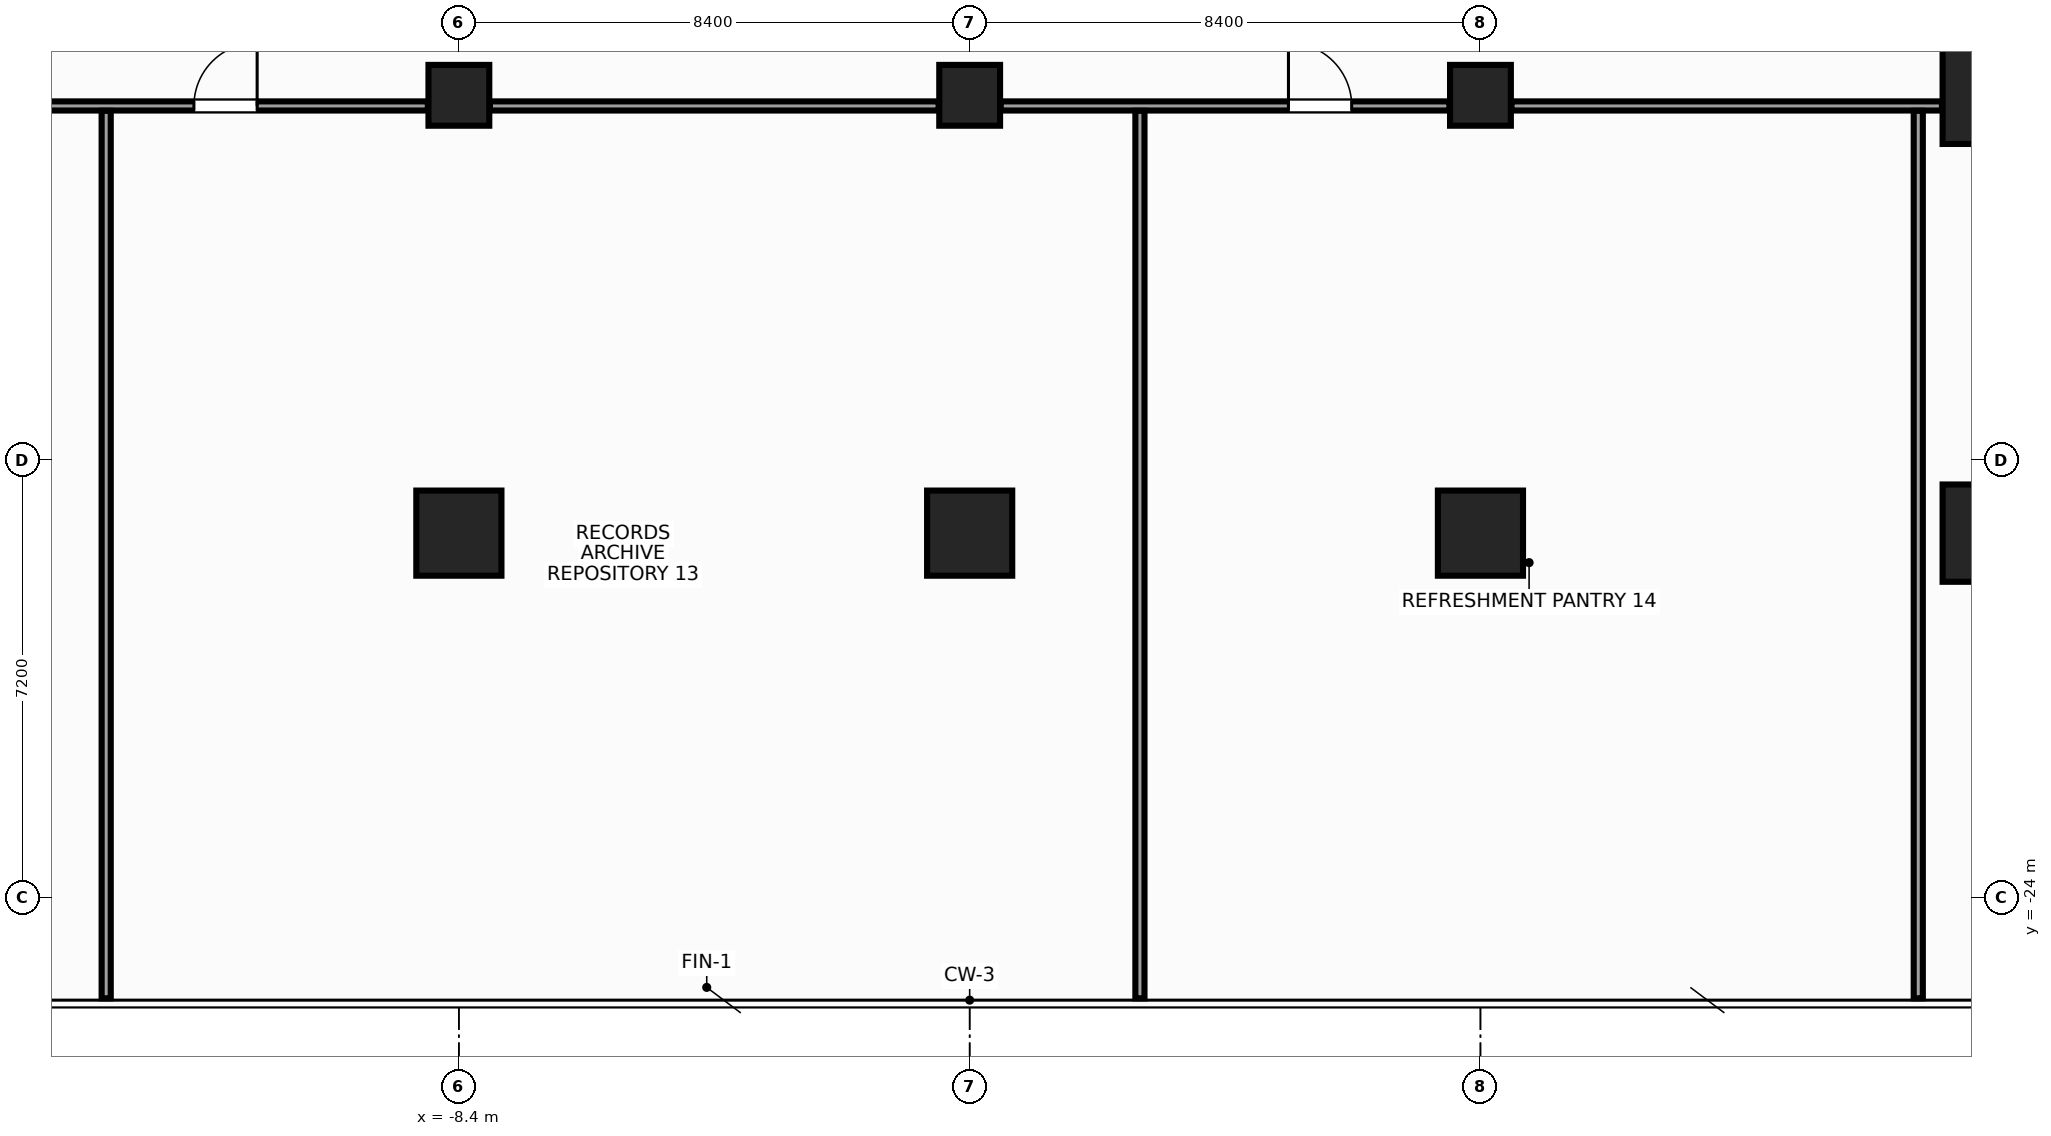
"""IFC4 building model, lengths in metres.
Left out: names, types, materials, properties, quantities, classifications, styles, units other than length and angle.
Written with IfcOpenShell. Run it as: python <this file> out.ifc"""

import sys

from ifc_helpers import new_model, si_unit, direction, frame, frame_2d, origin, origin_2d, place, context, subcontext, project, spatial, rectangle, hollow_rectangle, extrude, source, transform, mapped, element, fill, save


model = new_model("IFC4")
c1 = context("Model", 3, precision=1e-05, world=origin(), true_north=direction((0.0, 1.0)))
c2 = subcontext(c1, "Body", "Model", "MODEL_VIEW")
j1 = project(units=[si_unit("LENGTHUNIT", "METRE"), si_unit("PLANEANGLEUNIT", "RADIAN")], contexts=[c1])
p1 = place(None, origin())
s1 = spatial("IfcSite", under=j1, at=p1, CompositionType="ELEMENT")
p2 = place(p1, origin())
s2 = spatial("IfcBuilding", under=s1, at=p2, CompositionType="ELEMENT")
p3 = place(p2, frame((0.0, 0.0, 95.6)))
s3 = spatial("IfcBuildingStorey", under=s2, at=p3, CompositionType="ELEMENT", Elevation=95.6)
m1 = source(origin(), c2, "Body", "SweptSolid", [
    extrude(rectangle(XDim=1.6, YDim=1.6, at=origin_2d()), origin(), (0.0, 0.0, 1.0), 3.6),
])
for number, where, z_axis, x_axis in (
    (1, (16.8, -18.0, 0.0), (0.0, 0.0, 1.0), (1.0, 0.0, 0.0)),
    (2, (16.8, -10.8, 0.0), (0.0, 0.0, 1.0), (1.0, 0.0, 0.0)),
):
    element("IfcColumn", number, at=place(p3, frame(where, z_axis=z_axis, x_axis=x_axis)), inside=s3, PredefinedType="COLUMN", context=c2, shape_type="MappedRepresentation", body=[
        mapped(m1, transform((0.0, 0.0, 0.0), x_axis=(1.0, 0.0, 0.0), y_axis=(0.0, 1.0, 0.0), z_axis=(0.0, 0.0, 1.0), scale=1.0)),
    ])
m2 = source(origin(), c2, "Body", "SweptSolid", [
    extrude(rectangle(XDim=1.4, YDim=1.4, at=origin_2d()), origin(), (0.0, 0.0, 1.0), 3.6),
])
p4 = place(p3, frame((-8.4, -18.0, 0.0), z_axis=(0.0, 0.0, 1.0), x_axis=(1.0, 0.0, 0.0)))
e3 = element("IfcColumn", 3, at=p4, inside=s3, PredefinedType="COLUMN", context=c2, shape_type="MappedRepresentation", body=[
    mapped(m2, transform((0.0, 0.0, 0.0), x_axis=(1.0, 0.0, 0.0), y_axis=(0.0, 1.0, 0.0), z_axis=(0.0, 0.0, 1.0), scale=1.0)),
])
m3 = source(origin(), c2, "Body", "SweptSolid", [
    extrude(hollow_rectangle(XDim=1.0, YDim=1.0, WallThickness=0.045, at=origin_2d()), origin(), (0.0, 0.0, 1.0), 3.6),
])
p5 = place(p3, frame((-8.4, -10.8, 0.0), z_axis=(0.0, 0.0, 1.0), x_axis=(1.0, 0.0, 0.0)))
e4 = element("IfcColumn", 4, at=p5, inside=s3, PredefinedType="COLUMN", context=c2, shape_type="MappedRepresentation", body=[
    mapped(m3, transform((0.0, 0.0, 0.0), x_axis=(1.0, 0.0, 0.0), y_axis=(0.0, 1.0, 0.0), z_axis=(0.0, 0.0, 1.0), scale=1.0)),
])
p6 = place(p3, frame((8.4, -18.0, 0.0), z_axis=(0.0, 0.0, 1.0), x_axis=(1.0, 0.0, 0.0)))
e5 = element("IfcColumn", 5, at=p6, inside=s3, PredefinedType="COLUMN", context=c2, shape_type="MappedRepresentation", body=[
    mapped(m2, transform((0.0, 0.0, 0.0), x_axis=(1.0, 0.0, 0.0), y_axis=(0.0, 1.0, 0.0), z_axis=(0.0, 0.0, 1.0), scale=1.0)),
])
p7 = place(p3, frame((8.4, -10.8, 0.0), z_axis=(0.0, 0.0, 1.0), x_axis=(1.0, 0.0, 0.0)))
e6 = element("IfcColumn", 6, at=p7, inside=s3, PredefinedType="COLUMN", context=c2, shape_type="MappedRepresentation", body=[
    mapped(m3, transform((0.0, 0.0, 0.0), x_axis=(1.0, 0.0, 0.0), y_axis=(0.0, 1.0, 0.0), z_axis=(0.0, 0.0, 1.0), scale=1.0)),
])
p8 = place(p3, frame((0.0, -18.0, 0.0), z_axis=(0.0, 0.0, 1.0), x_axis=(1.0, 0.0, 0.0)))
e7 = element("IfcColumn", 7, at=p8, inside=s3, PredefinedType="COLUMN", context=c2, shape_type="MappedRepresentation", body=[
    mapped(m2, transform((0.0, 0.0, 0.0), x_axis=(1.0, 0.0, 0.0), y_axis=(0.0, 1.0, 0.0), z_axis=(0.0, 0.0, 1.0), scale=1.0)),
])
m4 = source(origin(), c2, "Body", "SweptSolid", [
    extrude(rectangle(XDim=1.0, YDim=1.0, at=origin_2d()), origin(), (0.0, 0.0, 1.0), 3.6),
])
p9 = place(p3, frame((0.0, -10.8, 0.0), z_axis=(0.0, 0.0, 1.0), x_axis=(1.0, 0.0, 0.0)))
e8 = element("IfcColumn", 8, at=p9, inside=s3, PredefinedType="COLUMN", context=c2, shape_type="MappedRepresentation", body=[
    mapped(m4, transform((0.0, 0.0, 0.0), x_axis=(1.0, 0.0, 0.0), y_axis=(0.0, 1.0, 0.0), z_axis=(0.0, 0.0, 1.0), scale=1.0)),
])
m5 = source(origin(), c2, "Body", "SweptSolid", [
    extrude(rectangle(XDim=7.08, YDim=0.15, at=frame_2d((3.54, 0.0))), origin(), (0.0, 0.0, 1.0), 2.745),
])
p10 = place(p3, frame((-15.99, -10.975, 0.0), z_axis=(0.0, 0.0, 1.0), x_axis=(1.0, 0.0, 0.0)))
e9 = element("IfcWall", 9, at=p10, inside=s3, PredefinedType="PARTITIONING", context=c2, shape_type="MappedRepresentation", body=[
    mapped(m5, transform((0.0, 0.0, 0.0), x_axis=(1.0, 0.0, 0.0), y_axis=(0.0, 1.0, 0.0), z_axis=(0.0, 0.0, 1.0), scale=1.0)),
])
p11 = place(p10, frame((3.232, 0.0, 0.0)))
e10 = element("IfcOpeningElement", 10, at=p11, cuts=e9, PredefinedType="OPENING", context=c2, shape_type="SweptSolid", body=[
    extrude(rectangle(XDim=1.04, YDim=2.2, at=frame_2d((0.52, 1.1))), frame((0.0, 0.087, 0.0), z_axis=(0.0, -1.0, 0.0), x_axis=(1.0, 0.0, 0.0)), (0.0, 0.0, 1.0), 0.174),
])
m6 = source(origin(), c2, "Body", "SweptSolid", [
    extrude(rectangle(XDim=7.38, YDim=0.15, at=frame_2d((3.69, 0.0))), origin(), (0.0, 0.0, 1.0), 2.745),
])
p12 = place(p3, frame((-7.89, -10.975, 0.0), z_axis=(0.0, 0.0, 1.0), x_axis=(1.0, 0.0, 0.0)))
e11 = element("IfcWall", 11, at=p12, inside=s3, PredefinedType="PARTITIONING", context=c2, shape_type="MappedRepresentation", body=[
    mapped(m6, transform((0.0, 0.0, 0.0), x_axis=(1.0, 0.0, 0.0), y_axis=(0.0, 1.0, 0.0), z_axis=(0.0, 0.0, 1.0), scale=1.0)),
])
p13 = place(p3, frame((0.51, -10.975, 0.0), z_axis=(0.0, 0.0, 1.0), x_axis=(1.0, 0.0, 0.0)))
e12 = element("IfcWall", 12, at=p13, inside=s3, PredefinedType="PARTITIONING", context=c2, shape_type="MappedRepresentation", body=[
    mapped(m6, transform((0.0, 0.0, 0.0), x_axis=(1.0, 0.0, 0.0), y_axis=(0.0, 1.0, 0.0), z_axis=(0.0, 0.0, 1.0), scale=1.0)),
])
p14 = place(p13, frame((4.732, 0.0, 0.0)))
e13 = element("IfcOpeningElement", 13, at=p14, cuts=e12, PredefinedType="OPENING", context=c2, shape_type="SweptSolid", body=[
    extrude(rectangle(XDim=1.04, YDim=2.2, at=frame_2d((0.52, 1.1))), frame((0.0, 0.087, 0.0), z_axis=(0.0, -1.0, 0.0), x_axis=(1.0, 0.0, 0.0)), (0.0, 0.0, 1.0), 0.174),
])
p15 = place(p3, frame((8.91, -10.975, 0.0), z_axis=(0.0, 0.0, 1.0), x_axis=(1.0, 0.0, 0.0)))
e14 = element("IfcWall", 14, at=p15, inside=s3, PredefinedType="PARTITIONING", context=c2, shape_type="MappedRepresentation", body=[
    mapped(m5, transform((0.0, 0.0, 0.0), x_axis=(1.0, 0.0, 0.0), y_axis=(0.0, 1.0, 0.0), z_axis=(0.0, 0.0, 1.0), scale=1.0)),
])
m7 = source(origin(), c2, "Body", "SweptSolid", [
    extrude(rectangle(XDim=14.595, YDim=0.15, at=frame_2d((7.297, 0.0))), origin(), (0.0, 0.0, 1.0), 2.745),
])
for number, where, z_axis, x_axis in (
    (15, (-14.2, -25.65, 0.0), (0.0, 0.0, 1.0), (0.0, 1.0, 0.0)),
    (16, (2.8, -25.65, 0.0), (0.0, 0.0, 1.0), (0.0, 1.0, 0.0)),
    (17, (15.6, -25.65, 0.0), (0.0, 0.0, 1.0), (0.0, 1.0, 0.0)),
):
    element("IfcWall", number, at=place(p3, frame(where, z_axis=z_axis, x_axis=x_axis)), inside=s3, PredefinedType="PARTITIONING", context=c2, shape_type="MappedRepresentation", body=[
        mapped(m7, transform((0.0, 0.0, 0.0), x_axis=(1.0, 0.0, 0.0), y_axis=(0.0, 1.0, 0.0), z_axis=(0.0, 0.0, 1.0), scale=1.0)),
    ])
m8 = source(origin(), c2, "Body", "SweptSolid", [
    extrude(rectangle(XDim=1.04, YDim=2.2, at=frame_2d((0.52, 1.1))), frame((0.0, 0.025, 0.0), z_axis=(0.0, -1.0, 0.0), x_axis=(1.0, 0.0, 0.0)), (0.0, 0.0, 1.0), 0.05),
])
p16 = place(p11, origin())
e18 = element("IfcDoor", 18, at=p16, inside=s3, OperationType="SINGLE_SWING_RIGHT", PredefinedType="DOOR", context=c2, shape_type="MappedRepresentation", body=[
    mapped(m8, transform((0.0, 0.0, 0.0), x_axis=(1.0, 0.0, 0.0), y_axis=(0.0, 1.0, 0.0), z_axis=(0.0, 0.0, 1.0), scale=1.0)),
])
fill(e10, e18)
p17 = place(p14, origin())
e19 = element("IfcDoor", 19, at=p17, inside=s3, OperationType="SINGLE_SWING_LEFT", PredefinedType="DOOR", context=c2, shape_type="MappedRepresentation", body=[
    mapped(m8, transform((0.0, 0.0, 0.0), x_axis=(1.0, 0.0, 0.0), y_axis=(0.0, 1.0, 0.0), z_axis=(0.0, 0.0, 1.0), scale=1.0)),
])
fill(e13, e19)
save(model, sys.argv[1])
